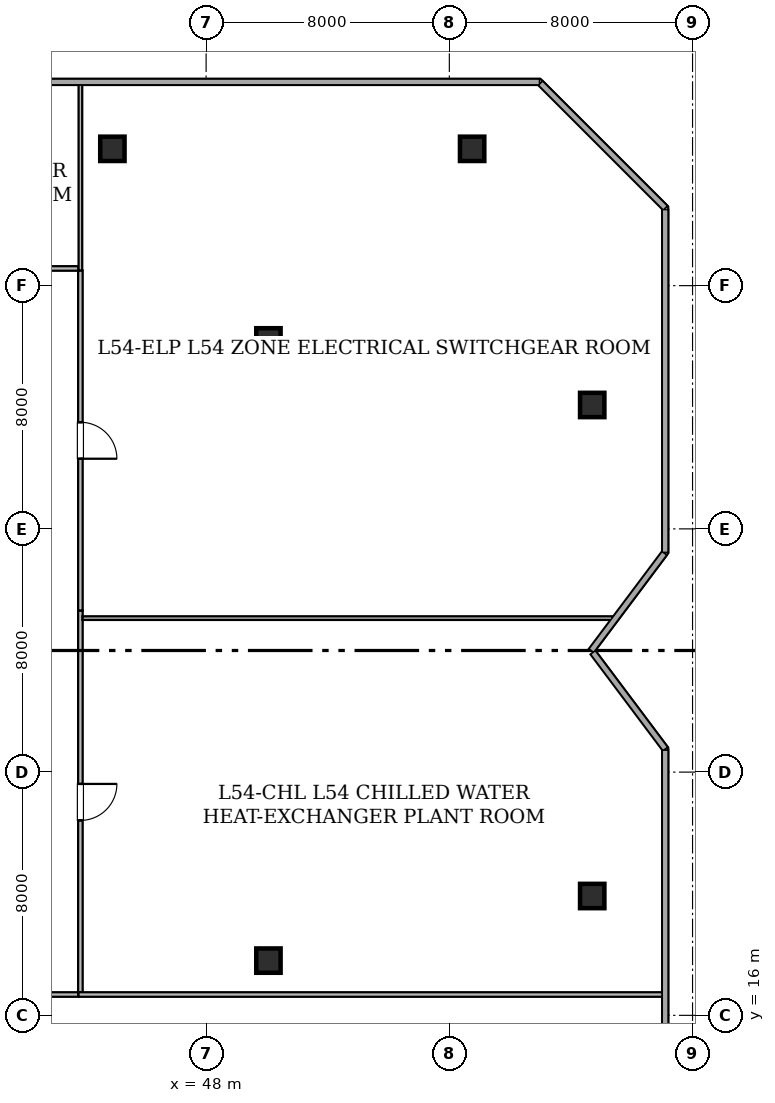
"""IFC4 building model, lengths in metres.
Left out: names, types, materials, properties, quantities, classifications, styles, units other than length and angle.
Written with IfcOpenShell. Run it as: python <this file> out.ifc"""

import sys

from ifc_helpers import new_model, si_unit, direction, frame, frame_2d, origin, origin_2d, place, context, subcontext, project, spatial, rectangle, hollow_rectangle, extrude, element, fill, save


model = new_model("IFC4")
c1 = context("Model", 3, precision=1e-05, world=origin(), true_north=direction((0.0, 1.0)))
c2 = subcontext(c1, "Body", "Model", "MODEL_VIEW")
j1 = project(units=[si_unit("LENGTHUNIT", "METRE"), si_unit("PLANEANGLEUNIT", "RADIAN")], contexts=[c1])
p1 = place(None, origin())
s1 = spatial("IfcSite", under=j1, at=p1, CompositionType="ELEMENT")
p2 = place(p1, origin())
s2 = spatial("IfcBuilding", under=s1, at=p2, CompositionType="ELEMENT")
p3 = place(p2, frame((0.0, 0.0, 211.8)))
s3 = spatial("IfcBuildingStorey", under=s2, at=p3, CompositionType="ELEMENT", Elevation=211.8)
for number, where, z_axis, x_axis in (
    (1, (44.917, 44.5, 0.0), (0.0, 0.0, 1.0), (1.0, 0.0, 0.0)),
    (2, (56.75, 44.5, 0.0), (0.0, 0.0, 1.0), (1.0, 0.0, 0.0)),
    (3, (60.7, 19.925, 0.0), (0.0, 0.0, 1.0), (1.0, 0.0, 0.0)),
    (4, (60.7, 36.075, 0.0), (0.0, 0.0, 1.0), (1.0, 0.0, 0.0)),
    (5, (50.05, 17.8, 0.0), (0.0, 0.0, 1.0), (1.0, 0.0, 0.0)),
    (6, (50.05, 38.2, 0.0), (0.0, 0.0, 1.0), (1.0, 0.0, 0.0)),
):
    element("IfcColumn", number, at=place(p3, frame(where, z_axis=z_axis, x_axis=x_axis)), inside=s3, PredefinedType="COLUMN", context=c2, shape_type="SweptSolid", body=[
        extrude(hollow_rectangle(XDim=0.8, YDim=0.8, WallThickness=0.04, at=origin_2d()), origin(), (0.0, 0.0, 1.0), 5.375),
    ])
p4 = place(p3, frame((19.102, 46.7, 0.0), z_axis=(0.0, 0.0, 1.0), x_axis=(1.0, 0.0, 0.0)))
e7 = element("IfcWall", 7, at=p4, inside=s3, PredefinedType="STANDARD", context=c2, shape_type="SweptSolid", body=[
    extrude(rectangle(XDim=39.857, YDim=0.2, at=frame_2d((19.928, 0.0))), origin(), (0.0, 0.0, 1.0), 1.15),
])
p5 = place(p3, frame((59.003, 46.656, 0.0), z_axis=(0.0, 0.0, 1.0), x_axis=(0.707127848917, -0.707085712828, 0.0)))
e8 = element("IfcWall", 8, at=p5, inside=s3, PredefinedType="STANDARD", context=c2, shape_type="SweptSolid", body=[
    extrude(rectangle(XDim=5.794, YDim=0.2, at=frame_2d((2.897, 0.0))), origin(), (0.0, 0.0, 1.0), 1.15),
])
p6 = place(p3, frame((63.1, 42.496, 0.0), z_axis=(0.0, 0.0, 1.0), x_axis=(0.0, -1.0, 0.0)))
e9 = element("IfcWall", 9, at=p6, inside=s3, PredefinedType="STANDARD", context=c2, shape_type="SweptSolid", body=[
    extrude(rectangle(XDim=11.263, YDim=0.2, at=frame_2d((5.632, 0.0))), origin(), (0.0, 0.0, 1.0), 1.15),
])
p7 = place(p3, frame((63.069, 31.191, 0.0), z_axis=(0.0, 0.0, 1.0), x_axis=(-0.600137081448, -0.799897170561, 0.0)))
e10 = element("IfcWall", 10, at=p7, inside=s3, PredefinedType="STANDARD", context=c2, shape_type="SweptSolid", body=[
    extrude(rectangle(XDim=3.989, YDim=0.2, at=frame_2d((1.995, 0.0))), origin(), (0.0, 0.0, 1.0), 1.15),
])
p8 = place(p3, frame((60.727, 27.931, 0.0), z_axis=(0.0, 0.0, 1.0), x_axis=(0.600029630681, -0.799977776132, 0.0)))
e11 = element("IfcWall", 11, at=p8, inside=s3, PredefinedType="STANDARD", context=c2, shape_type="SweptSolid", body=[
    extrude(rectangle(XDim=3.955, YDim=0.2, at=frame_2d((1.978, 0.0))), origin(), (0.0, 0.0, 1.0), 1.15),
])
p9 = place(p3, frame((63.1, 24.717, 0.0), z_axis=(0.0, 0.0, 1.0), x_axis=(0.0, -1.0, 0.0)))
e12 = element("IfcWall", 12, at=p9, inside=s3, PredefinedType="STANDARD", context=c2, shape_type="SweptSolid", body=[
    extrude(rectangle(XDim=11.276, YDim=0.2, at=frame_2d((5.638, 0.0))), origin(), (0.0, 0.0, 1.0), 1.15),
])
p10 = place(p3, frame((43.8, 16.685, 0.0), z_axis=(0.0, 0.0, 1.0), x_axis=(-1.0, 0.0, 0.0)))
e13 = element("IfcWall", 13, at=p10, inside=s3, PredefinedType="STANDARD", context=c2, shape_type="SweptSolid", body=[
    extrude(rectangle(XDim=18.7, YDim=0.15, at=frame_2d((9.35, 0.0))), origin(), (0.0, 0.0, 1.0), 3.42),
])
p11 = place(p10, frame((8.75, 0.0, 0.0)))
e14 = element("IfcOpeningElement", 14, at=p11, cuts=e13, PredefinedType="OPENING", context=c2, shape_type="SweptSolid", body=[
    extrude(rectangle(XDim=1.2, YDim=2.15, at=frame_2d((0.6, 1.075))), frame((0.0, 0.085, 0.0), z_axis=(0.0, -1.0, 0.0), x_axis=(1.0, 0.0, 0.0)), (0.0, 0.0, 1.0), 0.17),
])
p12 = place(p3, frame((43.865, 29.314, 0.0), z_axis=(0.0, 0.0, 1.0), x_axis=(0.0, -1.0, 0.0)))
e15 = element("IfcWall", 15, at=p12, inside=s3, PredefinedType="STANDARD", context=c2, shape_type="SweptSolid", body=[
    extrude(rectangle(XDim=12.564, YDim=0.15, at=frame_2d((6.282, 0.0))), origin(), (0.0, 0.0, 1.0), 3.42),
])
p13 = place(p12, frame((5.703, 0.0, 0.0)))
e16 = element("IfcOpeningElement", 16, at=p13, cuts=e15, PredefinedType="OPENING", context=c2, shape_type="SweptSolid", body=[
    extrude(rectangle(XDim=1.2, YDim=2.15, at=frame_2d((0.6, 1.075))), frame((0.0, 0.085, 0.0), z_axis=(0.0, -1.0, 0.0), x_axis=(1.0, 0.0, 0.0)), (0.0, 0.0, 1.0), 0.17),
])
p14 = place(p3, frame((43.865, 40.5, 0.0), z_axis=(0.0, 0.0, 1.0), x_axis=(0.0, -1.0, 0.0)))
e17 = element("IfcWall", 17, at=p14, inside=s3, PredefinedType="STANDARD", context=c2, shape_type="SweptSolid", body=[
    extrude(rectangle(XDim=11.186, YDim=0.15, at=frame_2d((5.593, 0.0))), origin(), (0.0, 0.0, 1.0), 3.42),
])
p15 = place(p14, frame((4.993, 0.0, 0.0)))
e18 = element("IfcOpeningElement", 18, at=p15, cuts=e17, PredefinedType="OPENING", context=c2, shape_type="SweptSolid", body=[
    extrude(rectangle(XDim=1.2, YDim=2.15, at=frame_2d((0.6, 1.075))), frame((0.0, 0.085, 0.0), z_axis=(0.0, -1.0, 0.0), x_axis=(1.0, 0.0, 0.0)), (0.0, 0.0, 1.0), 0.17),
])
p16 = place(p3, frame((25.1, 40.565, 0.0), z_axis=(0.0, 0.0, 1.0), x_axis=(1.0, 0.0, 0.0)))
e19 = element("IfcWall", 19, at=p16, inside=s3, PredefinedType="STANDARD", context=c2, shape_type="SweptSolid", body=[
    extrude(rectangle(XDim=18.7, YDim=0.15, at=frame_2d((9.35, 0.0))), origin(), (0.0, 0.0, 1.0), 3.42),
])
p17 = place(p16, frame((8.75, 0.0, 0.0)))
e20 = element("IfcOpeningElement", 20, at=p17, cuts=e19, PredefinedType="OPENING", context=c2, shape_type="SweptSolid", body=[
    extrude(rectangle(XDim=1.2, YDim=2.15, at=frame_2d((0.6, 1.075))), frame((0.0, 0.085, 0.0), z_axis=(0.0, -1.0, 0.0), x_axis=(1.0, 0.0, 0.0)), (0.0, 0.0, 1.0), 0.17),
])
p18 = place(p3, frame((43.8, 16.685, 0.0), z_axis=(0.0, 0.0, 1.0), x_axis=(1.0, 0.0, 0.0)))
e21 = element("IfcWall", 21, at=p18, inside=s3, PredefinedType="STANDARD", context=c2, shape_type="SweptSolid", body=[
    extrude(rectangle(XDim=19.208, YDim=0.15, at=frame_2d((9.604, 0.0))), origin(), (0.0, 0.0, 1.0), 3.42),
])
p19 = place(p3, frame((43.932, 29.065, 0.0), z_axis=(0.0, 0.0, 1.0), x_axis=(1.0, 0.0, 0.0)))
e22 = element("IfcWall", 22, at=p19, inside=s3, PredefinedType="PARTITIONING", context=c2, shape_type="SweptSolid", body=[
    extrude(rectangle(XDim=17.438, YDim=0.12, at=frame_2d((8.719, 0.0))), origin(), (0.0, 0.0, 1.0), 3.42),
])
p20 = place(p3, frame((43.865, 40.5, 0.0), z_axis=(0.0, 0.0, 1.0), x_axis=(0.0, 1.0, 0.0)))
e23 = element("IfcWall", 23, at=p20, inside=s3, PredefinedType="PARTITIONING", context=c2, shape_type="SweptSolid", body=[
    extrude(rectangle(XDim=6.108, YDim=0.12, at=frame_2d((3.054, 0.0))), origin(), (0.0, 0.0, 1.0), 3.42),
])
p21 = place(p13, origin())
e24 = element("IfcDoor", 24, at=p21, inside=s3, OperationType="SINGLE_SWING_LEFT", PredefinedType="DOOR", context=c2, shape_type="SweptSolid", body=[
    extrude(rectangle(XDim=1.2, YDim=2.15, at=frame_2d((0.6, 1.075))), frame((0.0, 0.025, 0.0), z_axis=(0.0, -1.0, 0.0), x_axis=(1.0, 0.0, 0.0)), (0.0, 0.0, 1.0), 0.05),
])
fill(e16, e24)
p22 = place(p15, origin())
e25 = element("IfcDoor", 25, at=p22, inside=s3, OperationType="SINGLE_SWING_RIGHT", PredefinedType="DOOR", context=c2, shape_type="SweptSolid", body=[
    extrude(rectangle(XDim=1.2, YDim=2.15, at=frame_2d((0.6, 1.075))), frame((0.0, 0.025, 0.0), z_axis=(0.0, -1.0, 0.0), x_axis=(1.0, 0.0, 0.0)), (0.0, 0.0, 1.0), 0.05),
])
fill(e18, e25)
save(model, sys.argv[1])
